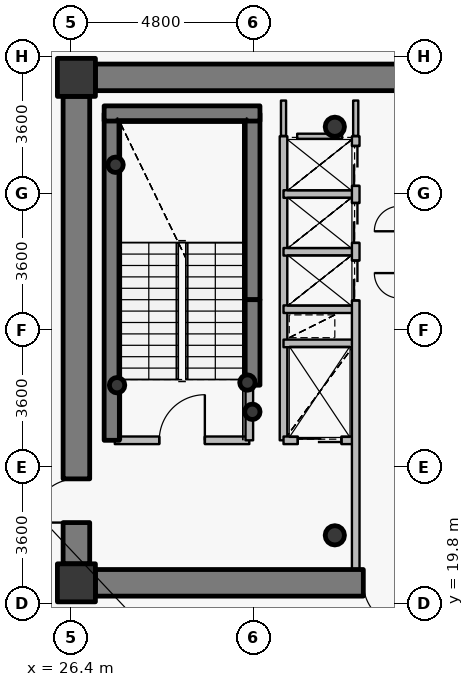
"""IFC4 building model, lengths in metres.
Left out: names, types, materials, properties, quantities, classifications, styles, units other than length and angle.
Written with IfcOpenShell. Run it as: python <this file> out.ifc"""

import sys

from ifc_helpers import new_model, si_unit, direction, frame, frame_2d, origin, origin_2d, place, context, subcontext, project, spatial, rectangle, hollow_circle, extrude, source, transform, mapped, element, fill, save


model = new_model("IFC4")
c1 = context("Model", 3, precision=1e-05, world=origin(), true_north=direction((0.0, 1.0)))
c2 = subcontext(c1, "Body", "Model", "MODEL_VIEW")
j1 = project(units=[si_unit("LENGTHUNIT", "METRE"), si_unit("PLANEANGLEUNIT", "RADIAN")], contexts=[c1])
p1 = place(None, origin())
s1 = spatial("IfcSite", under=j1, at=p1, CompositionType="ELEMENT")
p2 = place(p1, origin())
s2 = spatial("IfcBuilding", under=s1, at=p2, CompositionType="ELEMENT")
p3 = place(p2, frame((0.0, 0.0, 255.3)))
s3 = spatial("IfcBuildingStorey", under=s2, at=p3, CompositionType="ELEMENT", Elevation=255.3)
for number, where, z_axis, x_axis in (
    (1, (26.55, 20.35, 0.0), (0.0, 0.0, 1.0), (1.0, 0.0, 0.0)),
    (2, (26.55, 33.65, 0.0), (0.0, 0.0, 1.0), (1.0, 0.0, 0.0)),
):
    element("IfcColumn", number, at=place(p3, frame(where, z_axis=z_axis, x_axis=x_axis)), inside=s3, PredefinedType="COLUMN", context=c2, shape_type="SweptSolid", body=[
        extrude(rectangle(XDim=1.0, YDim=1.0, at=origin_2d()), origin(), (0.0, 0.0, 1.0), 3.75),
    ])
for number, where, z_axis, x_axis in (
    (3, (33.35, 21.6, 0.0), (0.0, 0.0, 1.0), (1.0, 0.0, 0.0)),
    (4, (33.35, 32.35, 0.0), (0.0, 0.0, 1.0), (1.0, 0.0, 0.0)),
):
    element("IfcColumn", number, at=place(p3, frame(where, z_axis=z_axis, x_axis=x_axis)), inside=s3, PredefinedType="COLUMN", context=c2, shape_type="SweptSolid", body=[
        extrude(hollow_circle(Radius=0.254, WallThickness=0.02, at=origin_2d()), origin(), (0.0, 0.0, 1.0), 3.75),
    ])
p4 = place(p3, frame((27.48, 24.1, 0.0), z_axis=(0.0, 0.0, 1.0), x_axis=(0.0, 1.0, 0.0)))
e5 = element("IfcWall", 5, at=p4, inside=s3, PredefinedType="SHEAR", context=c2, shape_type="SweptSolid", body=[
    extrude(rectangle(XDim=8.6, YDim=0.4, at=frame_2d((4.3, 0.0))), origin(), (0.0, 0.0, 1.0), 3.75),
])
p5 = place(p3, frame((31.18, 27.8, 0.0), z_axis=(0.0, 0.0, 1.0), x_axis=(0.0, 1.0, 0.0)))
e6 = element("IfcWall", 6, at=p5, inside=s3, PredefinedType="SHEAR", context=c2, shape_type="SweptSolid", body=[
    extrude(rectangle(XDim=4.9, YDim=0.4, at=frame_2d((2.45, 0.0))), origin(), (0.0, 0.0, 1.0), 3.75),
])
p6 = place(p3, frame((27.28, 32.7, 0.0), z_axis=(0.0, 0.0, 1.0), x_axis=(1.0, 0.0, 0.0)))
e7 = element("IfcWall", 7, at=p6, inside=s3, PredefinedType="SHEAR", context=c2, shape_type="SweptSolid", body=[
    extrude(rectangle(XDim=4.1, YDim=0.4, at=frame_2d((2.05, 0.0))), origin(), (0.0, 0.0, 1.0), 3.75),
])
for number, where, z_axis, x_axis in (
    (8, (27.58, 31.35, 0.0), (0.0, 0.0, 1.0), (1.0, 0.0, 0.0)),
    (9, (31.05, 25.62, 0.0), (0.0, 0.0, 1.0), (1.0, 0.0, 0.0)),
    (10, (31.18, 24.85, 0.0), (0.0, 0.0, 1.0), (1.0, 0.0, 0.0)),
    (11, (27.62, 25.55, 0.0), (0.0, 0.0, 1.0), (1.0, 0.0, 0.0)),
):
    element("IfcColumn", number, at=place(p3, frame(where, z_axis=z_axis, x_axis=x_axis)), inside=s3, PredefinedType="COLUMN", context=c2, shape_type="SweptSolid", body=[
        extrude(hollow_circle(Radius=0.203, WallThickness=0.016, at=origin_2d()), origin(), (0.0, 0.0, 1.0), 3.75),
    ])
p7 = place(p3, frame((27.05, 33.65, 0.0), z_axis=(0.0, 0.0, 1.0), x_axis=(1.0, 0.0, 0.0)))
e12 = element("IfcWall", 12, at=p7, inside=s3, PredefinedType="SHEAR", context=c2, shape_type="SweptSolid", body=[
    extrude(rectangle(XDim=17.9, YDim=0.7, at=frame_2d((8.95, 0.0))), origin(), (0.0, 0.0, 1.0), 3.05),
])
p8 = place(p7, frame((13.675, 0.0, 0.0)))
e13 = element("IfcOpeningElement", 13, at=p8, cuts=e12, PredefinedType="OPENING", context=c2, shape_type="SweptSolid", body=[
    extrude(rectangle(XDim=1.15, YDim=2.15, at=origin_2d()), frame((0.575, 0.36, 1.075), z_axis=(0.0, -1.0, 0.0), x_axis=(1.0, 0.0, 0.0)), (0.0, 0.0, 1.0), 0.72),
])
p9 = place(p3, frame((44.95, 20.35, 0.0), z_axis=(0.0, 0.0, 1.0), x_axis=(-1.0, 0.0, 0.0)))
e14 = element("IfcWall", 14, at=p9, inside=s3, PredefinedType="SHEAR", context=c2, shape_type="SweptSolid", body=[
    extrude(rectangle(XDim=17.9, YDim=0.7, at=frame_2d((8.95, 0.0))), origin(), (0.0, 0.0, 1.0), 3.05),
])
p10 = place(p9, frame((9.7, 0.0, 0.0)))
e15 = element("IfcOpeningElement", 15, at=p10, cuts=e14, PredefinedType="OPENING", context=c2, shape_type="SweptSolid", body=[
    extrude(rectangle(XDim=1.15, YDim=2.15, at=origin_2d()), frame((0.575, 0.36, 1.075), z_axis=(0.0, -1.0, 0.0), x_axis=(1.0, 0.0, 0.0)), (0.0, 0.0, 1.0), 0.72),
])
p11 = place(p3, frame((26.55, 20.85, 0.0), z_axis=(0.0, 0.0, 1.0), x_axis=(0.0, 1.0, 0.0)))
e16 = element("IfcWall", 16, at=p11, inside=s3, PredefinedType="SHEAR", context=c2, shape_type="SweptSolid", body=[
    extrude(rectangle(XDim=12.3, YDim=0.7, at=frame_2d((6.15, 0.0))), origin(), (0.0, 0.0, 1.0), 3.05),
])
p12 = place(p11, frame((1.085, 0.0, 0.0)))
e17 = element("IfcOpeningElement", 17, at=p12, cuts=e16, PredefinedType="OPENING", context=c2, shape_type="SweptSolid", body=[
    extrude(rectangle(XDim=1.15, YDim=2.15, at=origin_2d()), frame((0.575, 0.36, 1.075), z_axis=(0.0, -1.0, 0.0), x_axis=(1.0, 0.0, 0.0)), (0.0, 0.0, 1.0), 0.72),
])
p13 = place(p3, frame((31.18, 25.55, 0.0), z_axis=(0.0, 0.0, 1.0), x_axis=(0.0, 1.0, 0.0)))
e18 = element("IfcWall", 18, at=p13, inside=s3, PredefinedType="SHEAR", context=c2, shape_type="SweptSolid", body=[
    extrude(rectangle(XDim=2.25, YDim=0.4, at=frame_2d((1.125, 0.0))), origin(), (0.0, 0.0, 1.0), 3.1),
])
p14 = place(p3, frame((27.56, 24.1, 0.0), z_axis=(0.0, 0.0, 1.0), x_axis=(1.0, 0.0, 0.0)))
e19 = element("IfcWall", 19, at=p14, inside=s3, PredefinedType="PARTITIONING", context=c2, shape_type="SweptSolid", body=[
    extrude(rectangle(XDim=3.54, YDim=0.2, at=frame_2d((1.77, 0.0))), origin(), (0.0, 0.0, 1.0), 3.5),
])
p15 = place(p14, frame((1.17, 0.0, 0.0)))
e20 = element("IfcOpeningElement", 20, at=p15, cuts=e19, PredefinedType="OPENING", context=c2, shape_type="SweptSolid", body=[
    extrude(rectangle(XDim=1.2, YDim=2.15, at=origin_2d()), frame((0.6, 0.11, 1.075), z_axis=(0.0, -1.0, 0.0), x_axis=(1.0, 0.0, 0.0)), (0.0, 0.0, 1.0), 0.22),
])
p16 = place(p3, frame((31.1, 24.1, 0.0), z_axis=(0.0, 0.0, 1.0), x_axis=(0.0, 1.0, 0.0)))
e21 = element("IfcWall", 21, at=p16, inside=s3, PredefinedType="PARTITIONING", context=c2, shape_type="SweptSolid", body=[
    extrude(rectangle(XDim=1.44, YDim=0.2, at=frame_2d((0.72, 0.0))), origin(), (0.0, 0.0, 1.0), 3.5),
])
p17 = place(p3, frame((32.0, 24.1, 0.0), z_axis=(0.0, 0.0, 1.0), x_axis=(0.0, 1.0, 0.0)))
e22 = element("IfcWall", 22, at=p17, inside=s3, PredefinedType="PARTITIONING", context=c2, shape_type="SweptSolid", body=[
    extrude(rectangle(XDim=8.0, YDim=0.2, at=frame_2d((4.0, 0.0))), origin(), (0.0, 0.0, 1.0), 3.5),
])
p18 = place(p3, frame((32.0, 24.1, 0.0), z_axis=(0.0, 0.0, 1.0), x_axis=(1.0, 0.0, 0.0)))
e23 = element("IfcWall", 23, at=p18, inside=s3, PredefinedType="PARTITIONING", context=c2, shape_type="SweptSolid", body=[
    extrude(rectangle(XDim=1.9, YDim=0.2, at=frame_2d((0.95, 0.0))), origin(), (0.0, 0.0, 1.0), 3.085),
])
p19 = place(p18, frame((0.375, 0.0, 0.0)))
e24 = element("IfcOpeningElement", 24, at=p19, cuts=e23, PredefinedType="OPENING", context=c2, shape_type="SweptSolid", body=[
    extrude(rectangle(XDim=1.15, YDim=2.15, at=origin_2d()), frame((0.575, 0.11, 1.075), z_axis=(0.0, -1.0, 0.0), x_axis=(1.0, 0.0, 0.0)), (0.0, 0.0, 1.0), 0.22),
])
for number, where, z_axis, x_axis in (
    (25, (32.0, 26.65, 0.0), (0.0, 0.0, 1.0), (1.0, 0.0, 0.0)),
    (26, (32.0, 27.55, 0.0), (0.0, 0.0, 1.0), (1.0, 0.0, 0.0)),
    (27, (32.0, 29.06, 0.0), (0.0, 0.0, 1.0), (1.0, 0.0, 0.0)),
    (28, (32.0, 30.58, 0.0), (0.0, 0.0, 1.0), (1.0, 0.0, 0.0)),
):
    element("IfcWall", number, at=place(p3, frame(where, z_axis=z_axis, x_axis=x_axis)), inside=s3, PredefinedType="PARTITIONING", context=c2, shape_type="SweptSolid", body=[
        extrude(rectangle(XDim=1.9, YDim=0.2, at=frame_2d((0.95, 0.0))), origin(), (0.0, 0.0, 1.0), 3.085),
    ])
p20 = place(p3, frame((33.9, 20.7, 0.0), z_axis=(0.0, 0.0, 1.0), x_axis=(0.0, 1.0, 0.0)))
e29 = element("IfcWall", 29, at=p20, inside=s3, PredefinedType="PARTITIONING", context=c2, shape_type="SweptSolid", body=[
    extrude(rectangle(XDim=11.4, YDim=0.2, at=frame_2d((5.7, 0.0))), origin(), (0.0, 0.0, 1.0), 3.085),
])
p21 = place(p20, frame((7.08, 0.0, 0.0)))
e30 = element("IfcOpeningElement", 30, at=p21, cuts=e29, PredefinedType="OPENING", context=c2, shape_type="SweptSolid", body=[
    extrude(rectangle(XDim=1.05, YDim=2.15, at=origin_2d()), frame((0.525, 0.11, 1.075), z_axis=(0.0, -1.0, 0.0), x_axis=(1.0, 0.0, 0.0)), (0.0, 0.0, 1.0), 0.22),
])
p22 = place(p20, frame((8.595, 0.0, 0.0)))
e31 = element("IfcOpeningElement", 31, at=p22, cuts=e29, PredefinedType="OPENING", context=c2, shape_type="SweptSolid", body=[
    extrude(rectangle(XDim=1.05, YDim=2.15, at=origin_2d()), frame((0.525, 0.11, 1.075), z_axis=(0.0, -1.0, 0.0), x_axis=(1.0, 0.0, 0.0)), (0.0, 0.0, 1.0), 0.22),
])
p23 = place(p20, frame((10.095, 0.0, 0.0)))
e32 = element("IfcOpeningElement", 32, at=p23, cuts=e29, PredefinedType="OPENING", context=c2, shape_type="SweptSolid", body=[
    extrude(rectangle(XDim=1.05, YDim=2.15, at=origin_2d()), frame((0.525, 0.11, 1.075), z_axis=(0.0, -1.0, 0.0), x_axis=(1.0, 0.0, 0.0)), (0.0, 0.0, 1.0), 0.22),
])
p24 = place(p3, frame((32.36, 32.1, 0.0), z_axis=(0.0, 0.0, 1.0), x_axis=(1.0, 0.0, 0.0)))
e33 = element("IfcWall", 33, at=p24, inside=s3, PredefinedType="PARTITIONING", context=c2, shape_type="SweptSolid", body=[
    extrude(rectangle(XDim=1.18, YDim=0.135, at=frame_2d((0.59, 0.0))), origin(), (0.0, 0.0, 1.0), 3.085),
])
p25 = place(p3, frame((32.0, 33.04, 0.0), z_axis=(0.0, 0.0, 1.0), x_axis=(0.0, -1.0, 0.0)))
e34 = element("IfcWall", 34, at=p25, inside=s3, PredefinedType="PARTITIONING", context=c2, shape_type="SweptSolid", body=[
    extrude(rectangle(XDim=0.93, YDim=0.135, at=frame_2d((0.465, 0.0))), origin(), (0.0, 0.0, 1.0), 3.035),
])
p26 = place(p3, frame((33.9, 32.11, 0.0), z_axis=(0.0, 0.0, 1.0), x_axis=(0.0, 1.0, 0.0)))
e35 = element("IfcWall", 35, at=p26, inside=s3, PredefinedType="PARTITIONING", context=c2, shape_type="SweptSolid", body=[
    extrude(rectangle(XDim=0.93, YDim=0.135, at=frame_2d((0.465, 0.0))), origin(), (0.0, 0.0, 1.0), 3.085),
])
p27 = place(p3, frame((27.04, 34.0, 0.0), z_axis=(0.0, 0.0, 1.0), x_axis=(-1.0, 0.0, 0.0)))
e36 = element("IfcWall", 36, at=p27, inside=s3, PredefinedType="PARTITIONING", context=c2, shape_type="SweptSolid", body=[
    extrude(rectangle(XDim=0.84, YDim=0.135, at=frame_2d((0.42, 0.0))), origin(), (0.0, 0.0, 1.0), 2.935),
])
p28 = place(p3, frame((26.2, 33.692, 0.0), z_axis=(0.0, 0.0, 1.0), x_axis=(0.0, -1.0, 0.0)))
e37 = element("IfcWall", 37, at=p28, inside=s3, PredefinedType="PARTITIONING", context=c2, shape_type="SweptSolid", body=[
    extrude(rectangle(XDim=0.532, YDim=0.135, at=frame_2d((0.266, 0.0))), origin(), (0.0, 0.0, 1.0), 3.5),
])
p29 = place(p3, frame((26.2, 20.84, 0.0), z_axis=(0.0, 0.0, 1.0), x_axis=(0.0, -1.0, 0.0)))
e38 = element("IfcWall", 38, at=p29, inside=s3, PredefinedType="PARTITIONING", context=c2, shape_type="SweptSolid", body=[
    extrude(rectangle(XDim=0.84, YDim=0.135, at=frame_2d((0.42, 0.0))), origin(), (0.0, 0.0, 1.0), 3.5),
])
p30 = place(p3, frame((26.508, 20.0, 0.0), z_axis=(0.0, 0.0, 1.0), x_axis=(1.0, 0.0, 0.0)))
e39 = element("IfcWall", 39, at=p30, inside=s3, PredefinedType="PARTITIONING", context=c2, shape_type="SweptSolid", body=[
    extrude(rectangle(XDim=0.532, YDim=0.135, at=frame_2d((0.266, 0.0))), origin(), (0.0, 0.0, 1.0), 2.935),
])
m1 = source(origin(), c2, "Body", "SweptSolid", [
    extrude(rectangle(XDim=1.15, YDim=2.15, at=origin_2d()), frame((0.575, 0.025, 1.075), z_axis=(0.0, -1.0, 0.0), x_axis=(1.0, 0.0, 0.0)), (0.0, 0.0, 1.0), 0.05),
])
p31 = place(p12, origin())
e40 = element("IfcDoor", 40, at=p31, inside=s3, OperationType="SINGLE_SWING_LEFT", PredefinedType="DOOR", context=c2, shape_type="MappedRepresentation", body=[
    mapped(m1, transform((0.0, 0.0, 0.0), x_axis=(1.0, 0.0, 0.0), y_axis=(0.0, 1.0, 0.0), z_axis=(0.0, 0.0, 1.0), scale=1.0)),
])
fill(e17, e40)
p32 = place(p10, origin())
e41 = element("IfcDoor", 41, at=p32, inside=s3, OperationType="SINGLE_SWING_LEFT", PredefinedType="DOOR", context=c2, shape_type="MappedRepresentation", body=[
    mapped(m1, transform((0.0, 0.0, 0.0), x_axis=(1.0, 0.0, 0.0), y_axis=(0.0, 1.0, 0.0), z_axis=(0.0, 0.0, 1.0), scale=1.0)),
])
fill(e15, e41)
m2 = source(origin(), c2, "Body", "SweptSolid", [
    extrude(rectangle(XDim=1.2, YDim=2.15, at=origin_2d()), frame((0.6, 0.025, 1.075), z_axis=(0.0, -1.0, 0.0), x_axis=(1.0, 0.0, 0.0)), (0.0, 0.0, 1.0), 0.05),
])
p33 = place(p15, origin())
e42 = element("IfcDoor", 42, at=p33, inside=s3, OperationType="SINGLE_SWING_RIGHT", PredefinedType="DOOR", context=c2, shape_type="MappedRepresentation", body=[
    mapped(m2, transform((0.0, 0.0, 0.0), x_axis=(1.0, 0.0, 0.0), y_axis=(0.0, 1.0, 0.0), z_axis=(0.0, 0.0, 1.0), scale=1.0)),
])
fill(e20, e42)
m3 = source(origin(), c2, "Body", "SweptSolid", [
    extrude(rectangle(XDim=1.15, YDim=2.15, at=origin_2d()), frame((0.575, 0.025, 1.075), z_axis=(0.0, -1.0, 0.0), x_axis=(1.0, 0.0, 0.0)), (0.0, 0.0, 1.0), 0.05),
])
p34 = place(p19, origin())
e43 = element("IfcDoor", 43, at=p34, inside=s3, OperationType="DOUBLE_DOOR_SLIDING", PredefinedType="USERDEFINED", context=c2, shape_type="MappedRepresentation", body=[
    mapped(m3, transform((0.0, 0.0, 0.0), x_axis=(1.0, 0.0, 0.0), y_axis=(0.0, 1.0, 0.0), z_axis=(0.0, 0.0, 1.0), scale=1.0)),
])
fill(e24, e43)
m4 = source(origin(), c2, "Body", "SweptSolid", [
    extrude(rectangle(XDim=1.05, YDim=2.15, at=origin_2d()), frame((0.525, 0.025, 1.075), z_axis=(0.0, -1.0, 0.0), x_axis=(1.0, 0.0, 0.0)), (0.0, 0.0, 1.0), 0.05),
])
p35 = place(p21, origin())
e44 = element("IfcDoor", 44, at=p35, inside=s3, OperationType="DOUBLE_DOOR_SLIDING", PredefinedType="USERDEFINED", context=c2, shape_type="MappedRepresentation", body=[
    mapped(m4, transform((0.0, 0.0, 0.0), x_axis=(1.0, 0.0, 0.0), y_axis=(0.0, 1.0, 0.0), z_axis=(0.0, 0.0, 1.0), scale=1.0)),
])
fill(e30, e44)
p36 = place(p22, origin())
e45 = element("IfcDoor", 45, at=p36, inside=s3, OperationType="DOUBLE_DOOR_SLIDING", PredefinedType="USERDEFINED", context=c2, shape_type="MappedRepresentation", body=[
    mapped(m4, transform((0.0, 0.0, 0.0), x_axis=(1.0, 0.0, 0.0), y_axis=(0.0, 1.0, 0.0), z_axis=(0.0, 0.0, 1.0), scale=1.0)),
])
fill(e31, e45)
p37 = place(p23, origin())
e46 = element("IfcDoor", 46, at=p37, inside=s3, OperationType="DOUBLE_DOOR_SLIDING", PredefinedType="USERDEFINED", context=c2, shape_type="MappedRepresentation", body=[
    mapped(m4, transform((0.0, 0.0, 0.0), x_axis=(1.0, 0.0, 0.0), y_axis=(0.0, 1.0, 0.0), z_axis=(0.0, 0.0, 1.0), scale=1.0)),
])
fill(e32, e46)
save(model, sys.argv[1])
